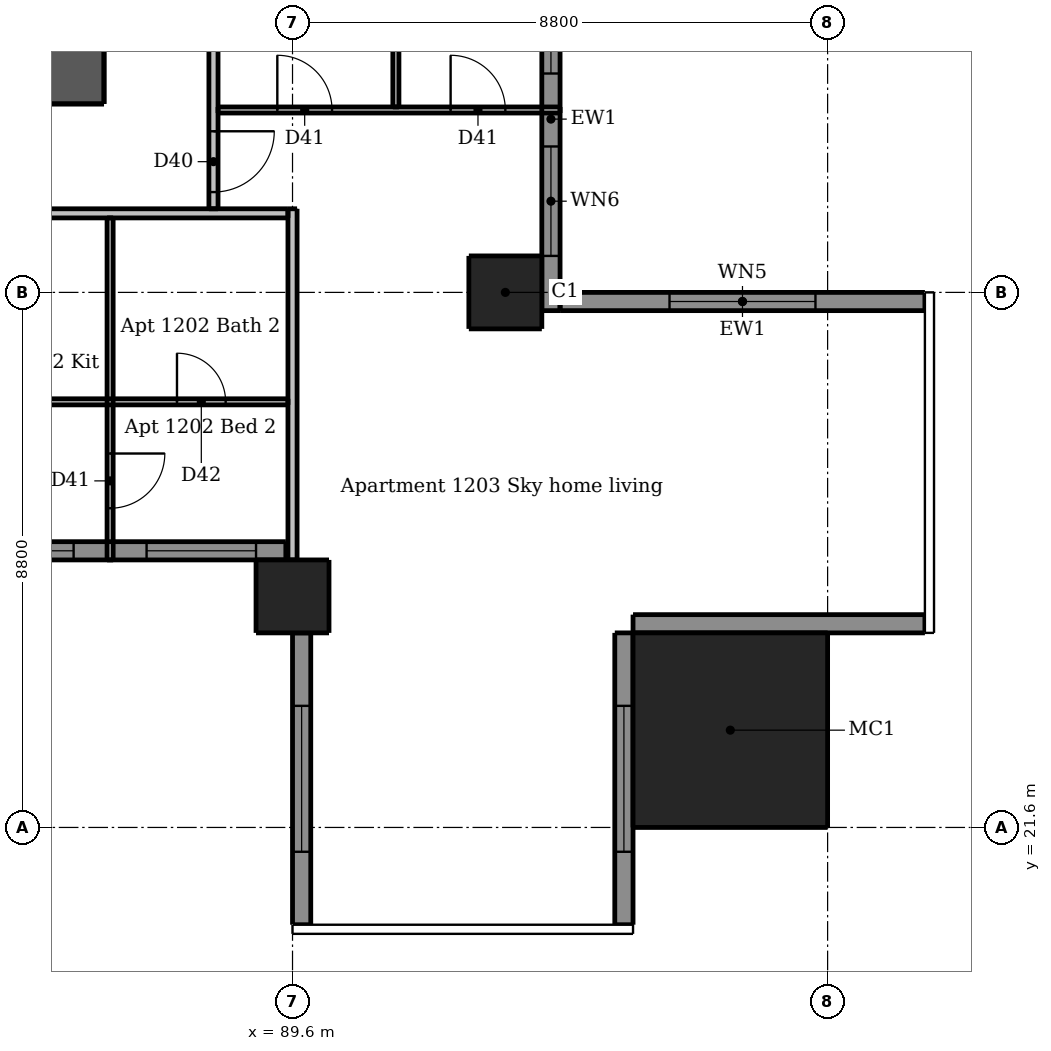
"""IFC4 building model, lengths in metres.
Left out: names, types, materials, properties, quantities, classifications, styles, units other than length and angle.
Written with IfcOpenShell. Run it as: python <this file> out.ifc"""

import sys

from ifc_helpers import new_model, si_unit, direction, frame, frame_2d, origin, origin_2d, place, context, subcontext, project, spatial, rectangle, extrude, element, fill, save


model = new_model("IFC4")
c1 = context("Model", 3, precision=1e-05, world=origin(), true_north=direction((0.0, 1.0)))
c2 = subcontext(c1, "Body", "Model", "MODEL_VIEW")
j1 = project(units=[si_unit("LENGTHUNIT", "METRE"), si_unit("PLANEANGLEUNIT", "RADIAN")], contexts=[c1])
p1 = place(None, origin())
s1 = spatial("IfcSite", under=j1, at=p1, CompositionType="ELEMENT")
p2 = place(p1, origin())
s2 = spatial("IfcBuilding", under=s1, at=p2, CompositionType="ELEMENT")
p3 = place(p2, frame((0.0, 0.0, 46.6)))
s3 = spatial("IfcBuildingStorey", under=s2, at=p3, CompositionType="ELEMENT", Elevation=46.6)
p4 = place(p3, frame((62.5, 33.95, 0.0), z_axis=(0.0, 0.0, 1.0), x_axis=(1.0, 0.0, 0.0)))
e1 = element("IfcWall", 1, at=p4, inside=s3, PredefinedType="SHEAR", context=c2, shape_type="SweptSolid", body=[
    extrude(rectangle(XDim=24.0, YDim=0.9, at=frame_2d((12.0, 0.0))), origin(), (0.0, 0.0, 1.0), 3.05),
])
p5 = place(p4, frame((2.05, 0.0, 0.0)))
e2 = element("IfcOpeningElement", 2, at=p5, cuts=e1, PredefinedType="OPENING", context=c2, shape_type="SweptSolid", body=[
    extrude(rectangle(XDim=1.1, YDim=2.1, at=frame_2d((0.55, 1.05))), frame((0.0, 0.46, 0.0), z_axis=(0.0, -1.0, 0.0), x_axis=(1.0, 0.0, 0.0)), (0.0, 0.0, 1.0), 0.92),
])
p6 = place(p4, frame((20.85, 0.0, 0.0)))
e3 = element("IfcOpeningElement", 3, at=p6, cuts=e1, PredefinedType="OPENING", context=c2, shape_type="SweptSolid", body=[
    extrude(rectangle(XDim=1.1, YDim=2.1, at=frame_2d((0.55, 1.05))), frame((0.0, 0.46, 0.0), z_axis=(0.0, -1.0, 0.0), x_axis=(1.0, 0.0, 0.0)), (0.0, 0.0, 1.0), 0.92),
])
p7 = place(p4, frame((8.0, 0.0, 0.0)))
e4 = element("IfcOpeningElement", 4, at=p7, cuts=e1, PredefinedType="OPENING", context=c2, shape_type="SweptSolid", body=[
    extrude(rectangle(XDim=1.1, YDim=2.1, at=frame_2d((0.55, 1.05))), frame((0.0, 0.46, 0.0), z_axis=(0.0, -1.0, 0.0), x_axis=(1.0, 0.0, 0.0)), (0.0, 0.0, 1.0), 0.92),
])
p8 = place(p4, frame((17.488, 0.0, 0.0)))
e5 = element("IfcOpeningElement", 5, at=p8, cuts=e1, PredefinedType="OPENING", context=c2, shape_type="SweptSolid", body=[
    extrude(rectangle(XDim=0.9, YDim=2.1, at=frame_2d((0.45, 1.05))), frame((0.0, 0.46, 0.0), z_axis=(0.0, -1.0, 0.0), x_axis=(1.0, 0.0, 0.0)), (0.0, 0.0, 1.0), 0.92),
])
p9 = place(p3, frame((86.05, 33.5, 0.0), z_axis=(0.0, 0.0, 1.0), x_axis=(0.0, 1.0, 0.0)))
e6 = element("IfcWall", 6, at=p9, inside=s3, PredefinedType="SHEAR", context=c2, shape_type="SweptSolid", body=[
    extrude(rectangle(XDim=24.0, YDim=0.9, at=frame_2d((12.0, 0.0))), origin(), (0.0, 0.0, 1.0), 3.05),
])
p10 = place(p9, frame((11.2, 0.0, 0.0)))
e7 = element("IfcOpeningElement", 7, at=p10, cuts=e6, PredefinedType="OPENING", context=c2, shape_type="SweptSolid", body=[
    extrude(rectangle(XDim=1.6, YDim=2.1, at=frame_2d((0.8, 1.05))), frame((0.0, 0.46, 0.0), z_axis=(0.0, -1.0, 0.0), x_axis=(1.0, 0.0, 0.0)), (0.0, 0.0, 1.0), 0.92),
])
for number, where, z_axis, x_axis in (
    (8, (89.6, 25.4, 0.0), (0.0, 0.0, 1.0), (1.0, 0.0, 0.0)),
    (9, (93.1, 30.4, 0.0), (0.0, 0.0, 1.0), (1.0, 0.0, 0.0)),
):
    element("IfcColumn", number, at=place(p3, frame(where, z_axis=z_axis, x_axis=x_axis)), inside=s3, PredefinedType="COLUMN", context=c2, shape_type="SweptSolid", body=[
        extrude(rectangle(XDim=1.2, YDim=1.2, at=origin_2d()), origin(), (0.0, 0.0, 1.0), 3.05),
    ])
p11 = place(p3, frame((96.8, 23.2, 0.0), z_axis=(0.0, 0.0, 1.0), x_axis=(1.0, 0.0, 0.0)))
e10 = element("IfcColumn", 10, at=p11, inside=s3, PredefinedType="COLUMN", context=c2, shape_type="SweptSolid", body=[
    extrude(rectangle(XDim=3.2, YDim=3.2, at=origin_2d()), origin(), (0.0, 0.0, 1.0), 3.3),
])
p12 = place(p3, frame((89.75, 24.8, 0.0), z_axis=(0.0, 0.0, 1.0), x_axis=(0.0, -1.0, 0.0)))
e11 = element("IfcWall", 11, at=p12, inside=s3, PredefinedType="SOLIDWALL", context=c2, shape_type="SweptSolid", body=[
    extrude(rectangle(XDim=4.8, YDim=0.3, at=frame_2d((2.4, 0.0))), origin(), (0.0, 0.0, 1.0), 3.05),
])
p13 = place(p12, frame((1.2, 0.0, 0.15)))
e12 = element("IfcOpeningElement", 12, at=p13, cuts=e11, PredefinedType="OPENING", context=c2, shape_type="SweptSolid", body=[
    extrude(rectangle(XDim=2.4, YDim=2.1, at=frame_2d((1.2, 1.05))), frame((0.0, 0.16, 0.0), z_axis=(0.0, -1.0, 0.0), x_axis=(1.0, 0.0, 0.0)), (0.0, 0.0, 1.0), 0.32),
])
p14 = place(p3, frame((95.05, 20.0, 0.0), z_axis=(0.0, 0.0, 1.0), x_axis=(0.0, 1.0, 0.0)))
e13 = element("IfcWall", 13, at=p14, inside=s3, PredefinedType="SOLIDWALL", context=c2, shape_type="SweptSolid", body=[
    extrude(rectangle(XDim=4.8, YDim=0.3, at=frame_2d((2.4, 0.0))), origin(), (0.0, 0.0, 1.0), 3.05),
])
p15 = place(p14, frame((1.2, 0.0, 0.15)))
e14 = element("IfcOpeningElement", 14, at=p15, cuts=e13, PredefinedType="OPENING", context=c2, shape_type="SweptSolid", body=[
    extrude(rectangle(XDim=2.4, YDim=2.1, at=frame_2d((1.2, 1.05))), frame((0.0, 0.16, 0.0), z_axis=(0.0, -1.0, 0.0), x_axis=(1.0, 0.0, 0.0)), (0.0, 0.0, 1.0), 0.32),
])
p16 = place(p3, frame((95.2, 24.95, 0.0), z_axis=(0.0, 0.0, 1.0), x_axis=(1.0, 0.0, 0.0)))
e15 = element("IfcWall", 15, at=p16, inside=s3, PredefinedType="SOLIDWALL", context=c2, shape_type="SweptSolid", body=[
    extrude(rectangle(XDim=4.8, YDim=0.3, at=frame_2d((2.4, 0.0))), origin(), (0.0, 0.0, 1.0), 3.05),
])
p17 = place(p3, frame((100.0, 30.25, 0.0), z_axis=(0.0, 0.0, 1.0), x_axis=(-1.0, 0.0, 0.0)))
e16 = element("IfcWall", 16, at=p17, inside=s3, PredefinedType="SOLIDWALL", context=c2, shape_type="SweptSolid", body=[
    extrude(rectangle(XDim=6.0, YDim=0.3, at=frame_2d((3.0, 0.0))), origin(), (0.0, 0.0, 1.0), 3.05),
])
p18 = place(p17, frame((1.8, 0.0, 0.15)))
e17 = element("IfcOpeningElement", 17, at=p18, cuts=e16, PredefinedType="OPENING", context=c2, shape_type="SweptSolid", body=[
    extrude(rectangle(XDim=2.4, YDim=2.1, at=frame_2d((1.2, 1.05))), frame((0.0, 0.16, 0.0), z_axis=(0.0, -1.0, 0.0), x_axis=(1.0, 0.0, 0.0)), (0.0, 0.0, 1.0), 0.32),
])
p19 = place(p3, frame((83.6, 26.15, 0.0), z_axis=(0.0, 0.0, 1.0), x_axis=(1.0, 0.0, 0.0)))
e18 = element("IfcWall", 18, at=p19, inside=s3, PredefinedType="SOLIDWALL", context=c2, shape_type="SweptSolid", body=[
    extrude(rectangle(XDim=5.89, YDim=0.3, at=frame_2d((2.945, 0.0))), origin(), (0.0, 0.0, 1.0), 3.05),
])
p20 = place(p19, frame((0.6, 0.0, 0.15)))
e19 = element("IfcOpeningElement", 19, at=p20, cuts=e18, PredefinedType="OPENING", context=c2, shape_type="SweptSolid", body=[
    extrude(rectangle(XDim=1.8, YDim=2.1, at=frame_2d((0.9, 1.05))), frame((0.0, 0.16, 0.0), z_axis=(0.0, -1.0, 0.0), x_axis=(1.0, 0.0, 0.0)), (0.0, 0.0, 1.0), 0.32),
])
p21 = place(p19, frame((3.6, 0.0, 0.15)))
e20 = element("IfcOpeningElement", 20, at=p21, cuts=e18, PredefinedType="OPENING", context=c2, shape_type="SweptSolid", body=[
    extrude(rectangle(XDim=1.8, YDim=2.1, at=frame_2d((0.9, 1.05))), frame((0.0, 0.16, 0.0), z_axis=(0.0, -1.0, 0.0), x_axis=(1.0, 0.0, 0.0)), (0.0, 0.0, 1.0), 0.32),
])
p22 = place(p3, frame((93.85, 30.1, 0.0), z_axis=(0.0, 0.0, 1.0), x_axis=(0.0, 1.0, 0.0)))
e21 = element("IfcWall", 21, at=p22, inside=s3, PredefinedType="SOLIDWALL", context=c2, shape_type="SweptSolid", body=[
    extrude(rectangle(XDim=6.3, YDim=0.3, at=frame_2d((3.15, 0.0))), origin(), (0.0, 0.0, 1.0), 3.05),
])
p23 = place(p22, frame((0.9, 0.0, 0.15)))
e22 = element("IfcOpeningElement", 22, at=p23, cuts=e21, PredefinedType="OPENING", context=c2, shape_type="SweptSolid", body=[
    extrude(rectangle(XDim=1.8, YDim=2.1, at=frame_2d((0.9, 1.05))), frame((0.0, 0.16, 0.0), z_axis=(0.0, -1.0, 0.0), x_axis=(1.0, 0.0, 0.0)), (0.0, 0.0, 1.0), 0.32),
])
p24 = place(p22, frame((3.9, 0.0, 0.15)))
e23 = element("IfcOpeningElement", 23, at=p24, cuts=e21, PredefinedType="OPENING", context=c2, shape_type="SweptSolid", body=[
    extrude(rectangle(XDim=1.8, YDim=2.1, at=frame_2d((0.9, 1.05))), frame((0.0, 0.16, 0.0), z_axis=(0.0, -1.0, 0.0), x_axis=(1.0, 0.0, 0.0)), (0.0, 0.0, 1.0), 0.32),
])
p25 = place(p3, frame((86.6, 31.625, 0.0), z_axis=(0.0, 0.0, 1.0), x_axis=(0.0, -1.0, 0.0)))
e24 = element("IfcWall", 24, at=p25, inside=s3, PredefinedType="PARTITIONING", context=c2, shape_type="SweptSolid", body=[
    extrude(rectangle(XDim=5.625, YDim=0.1, at=frame_2d((2.812, 0.0))), origin(), (0.0, 0.0, 1.0), 3.05),
])
p26 = place(p25, frame((3.875, 0.0, 0.0)))
e25 = element("IfcOpeningElement", 25, at=p26, cuts=e24, PredefinedType="OPENING", context=c2, shape_type="SweptSolid", body=[
    extrude(rectangle(XDim=0.9, YDim=2.1, at=frame_2d((0.45, 1.05))), frame((0.0, 0.06, 0.0), z_axis=(0.0, -1.0, 0.0), x_axis=(1.0, 0.0, 0.0)), (0.0, 0.0, 1.0), 0.12),
])
p27 = place(p3, frame((91.3, 33.45, 0.0), z_axis=(0.0, 0.0, 1.0), x_axis=(0.0, 1.0, 0.0)))
e26 = element("IfcWall", 26, at=p27, inside=s3, PredefinedType="PARTITIONING", context=c2, shape_type="SweptSolid", body=[
    extrude(rectangle(XDim=5.975, YDim=0.1, at=frame_2d((2.988, 0.0))), origin(), (0.0, 0.0, 1.0), 3.05),
])
p28 = place(p27, frame((3.8, 0.0, 0.0)))
e27 = element("IfcOpeningElement", 27, at=p28, cuts=e26, PredefinedType="OPENING", context=c2, shape_type="SweptSolid", body=[
    extrude(rectangle(XDim=0.8, YDim=2.1, at=frame_2d((0.4, 1.05))), frame((0.0, 0.06, 0.0), z_axis=(0.0, -1.0, 0.0), x_axis=(1.0, 0.0, 0.0)), (0.0, 0.0, 1.0), 0.12),
])
p29 = place(p3, frame((88.375, 33.4, 0.0), z_axis=(0.0, 0.0, 1.0), x_axis=(1.0, 0.0, 0.0)))
e28 = element("IfcWall", 28, at=p29, inside=s3, PredefinedType="PARTITIONING", context=c2, shape_type="SweptSolid", body=[
    extrude(rectangle(XDim=5.625, YDim=0.1, at=frame_2d((2.812, 0.0))), origin(), (0.0, 0.0, 1.0), 3.05),
])
p30 = place(p29, frame((0.975, 0.0, 0.0)))
e29 = element("IfcOpeningElement", 29, at=p30, cuts=e28, PredefinedType="OPENING", context=c2, shape_type="SweptSolid", body=[
    extrude(rectangle(XDim=0.9, YDim=2.1, at=frame_2d((0.45, 1.05))), frame((0.0, 0.06, 0.0), z_axis=(0.0, -1.0, 0.0), x_axis=(1.0, 0.0, 0.0)), (0.0, 0.0, 1.0), 0.12),
])
p31 = place(p29, frame((3.825, 0.0, 0.0)))
e30 = element("IfcOpeningElement", 30, at=p31, cuts=e28, PredefinedType="OPENING", context=c2, shape_type="SweptSolid", body=[
    extrude(rectangle(XDim=0.9, YDim=2.1, at=frame_2d((0.45, 1.05))), frame((0.0, 0.06, 0.0), z_axis=(0.0, -1.0, 0.0), x_axis=(1.0, 0.0, 0.0)), (0.0, 0.0, 1.0), 0.12),
])
p32 = place(p3, frame((84.25, 28.6, 0.0), z_axis=(0.0, 0.0, 1.0), x_axis=(1.0, 0.0, 0.0)))
e31 = element("IfcWall", 31, at=p32, inside=s3, PredefinedType="PARTITIONING", context=c2, shape_type="SweptSolid", body=[
    extrude(rectangle(XDim=5.275, YDim=0.1, at=frame_2d((2.637, 0.0))), origin(), (0.0, 0.0, 1.0), 3.05),
])
p33 = place(p32, frame((3.45, 0.0, 0.0)))
e32 = element("IfcOpeningElement", 32, at=p33, cuts=e31, PredefinedType="OPENING", context=c2, shape_type="SweptSolid", body=[
    extrude(rectangle(XDim=0.8, YDim=2.1, at=frame_2d((0.4, 1.05))), frame((0.0, 0.06, 0.0), z_axis=(0.0, -1.0, 0.0), x_axis=(1.0, 0.0, 0.0)), (0.0, 0.0, 1.0), 0.12),
])
p34 = place(p3, frame((88.3, 60.475, 0.0), z_axis=(0.0, 0.0, 1.0), x_axis=(0.0, -1.0, 0.0)))
e33 = element("IfcWall", 33, at=p34, inside=s3, PredefinedType="PARTITIONING", context=c2, shape_type="SweptSolid", body=[
    extrude(rectangle(XDim=28.7, YDim=0.15, at=frame_2d((14.35, 0.0))), origin(), (0.0, 0.0, 1.0), 3.05),
])
p35 = place(p34, frame((27.425, 0.0, 0.0)))
e34 = element("IfcOpeningElement", 34, at=p35, cuts=e33, PredefinedType="OPENING", context=c2, shape_type="SweptSolid", body=[
    extrude(rectangle(XDim=1.0, YDim=2.1, at=frame_2d((0.5, 1.05))), frame((0.0, 0.085, 0.0), z_axis=(0.0, -1.0, 0.0), x_axis=(1.0, 0.0, 0.0)), (0.0, 0.0, 1.0), 0.17),
])
p36 = place(p34, frame((10.575, 0.0, 0.0)))
e35 = element("IfcOpeningElement", 35, at=p36, cuts=e33, PredefinedType="OPENING", context=c2, shape_type="SweptSolid", body=[
    extrude(rectangle(XDim=1.0, YDim=2.1, at=frame_2d((0.5, 1.05))), frame((0.0, 0.085, 0.0), z_axis=(0.0, -1.0, 0.0), x_axis=(1.0, 0.0, 0.0)), (0.0, 0.0, 1.0), 0.17),
])
p37 = place(p3, frame((89.6, 26.0, 0.0), z_axis=(0.0, 0.0, 1.0), x_axis=(0.0, 1.0, 0.0)))
e36 = element("IfcWall", 36, at=p37, inside=s3, PredefinedType="PARTITIONING", context=c2, shape_type="SweptSolid", body=[
    extrude(rectangle(XDim=5.775, YDim=0.15, at=frame_2d((2.887, 0.0))), origin(), (0.0, 0.0, 1.0), 2.516),
])
p38 = place(p3, frame((89.525, 31.7, 0.0), z_axis=(0.0, 0.0, 1.0), x_axis=(-1.0, 0.0, 0.0)))
e37 = element("IfcWall", 37, at=p38, inside=s3, PredefinedType="PARTITIONING", context=c2, shape_type="SweptSolid", body=[
    extrude(rectangle(XDim=28.75, YDim=0.15, at=frame_2d((14.375, 0.0))), origin(), (0.0, 0.0, 1.0), 3.05),
])
p39 = place(p38, frame((24.325, 0.0, 0.0)))
e38 = element("IfcOpeningElement", 38, at=p39, cuts=e37, PredefinedType="OPENING", context=c2, shape_type="SweptSolid", body=[
    extrude(rectangle(XDim=1.0, YDim=2.1, at=frame_2d((0.5, 1.05))), frame((0.0, 0.085, 0.0), z_axis=(0.0, -1.0, 0.0), x_axis=(1.0, 0.0, 0.0)), (0.0, 0.0, 1.0), 0.17),
])
p40 = place(p38, frame((6.575, 0.0, 0.0)))
e39 = element("IfcOpeningElement", 39, at=p40, cuts=e37, PredefinedType="OPENING", context=c2, shape_type="SweptSolid", body=[
    extrude(rectangle(XDim=1.0, YDim=2.1, at=frame_2d((0.5, 1.05))), frame((0.0, 0.085, 0.0), z_axis=(0.0, -1.0, 0.0), x_axis=(1.0, 0.0, 0.0)), (0.0, 0.0, 1.0), 0.17),
])
p41 = place(p13, origin())
e40 = element("IfcWindow", 40, at=p41, inside=s3, PartitioningType="DOUBLE_PANEL_VERTICAL", PredefinedType="WINDOW", context=c2, shape_type="SweptSolid", body=[
    extrude(rectangle(XDim=2.4, YDim=2.1, at=frame_2d((1.2, 1.05))), frame((0.0, 0.03, 0.0), z_axis=(0.0, -1.0, 0.0), x_axis=(1.0, 0.0, 0.0)), (0.0, 0.0, 1.0), 0.06),
])
fill(e12, e40)
p42 = place(p15, origin())
e41 = element("IfcWindow", 41, at=p42, inside=s3, PartitioningType="DOUBLE_PANEL_VERTICAL", PredefinedType="WINDOW", context=c2, shape_type="SweptSolid", body=[
    extrude(rectangle(XDim=2.4, YDim=2.1, at=frame_2d((1.2, 1.05))), frame((0.0, 0.03, 0.0), z_axis=(0.0, -1.0, 0.0), x_axis=(1.0, 0.0, 0.0)), (0.0, 0.0, 1.0), 0.06),
])
fill(e14, e41)
p43 = place(p18, origin())
e42 = element("IfcWindow", 42, at=p43, inside=s3, PartitioningType="DOUBLE_PANEL_VERTICAL", PredefinedType="WINDOW", context=c2, shape_type="SweptSolid", body=[
    extrude(rectangle(XDim=2.4, YDim=2.1, at=frame_2d((1.2, 1.05))), frame((0.0, 0.03, 0.0), z_axis=(0.0, -1.0, 0.0), x_axis=(1.0, 0.0, 0.0)), (0.0, 0.0, 1.0), 0.06),
])
fill(e17, e42)
p44 = place(p20, origin())
e43 = element("IfcWindow", 43, at=p44, inside=s3, PartitioningType="DOUBLE_PANEL_VERTICAL", PredefinedType="WINDOW", context=c2, shape_type="SweptSolid", body=[
    extrude(rectangle(XDim=1.8, YDim=2.1, at=frame_2d((0.9, 1.05))), frame((0.0, 0.03, 0.0), z_axis=(0.0, -1.0, 0.0), x_axis=(1.0, 0.0, 0.0)), (0.0, 0.0, 1.0), 0.06),
])
fill(e19, e43)
p45 = place(p21, origin())
e44 = element("IfcWindow", 44, at=p45, inside=s3, PartitioningType="DOUBLE_PANEL_VERTICAL", PredefinedType="WINDOW", context=c2, shape_type="SweptSolid", body=[
    extrude(rectangle(XDim=1.8, YDim=2.1, at=frame_2d((0.9, 1.05))), frame((0.0, 0.03, 0.0), z_axis=(0.0, -1.0, 0.0), x_axis=(1.0, 0.0, 0.0)), (0.0, 0.0, 1.0), 0.06),
])
fill(e20, e44)
p46 = place(p23, origin())
e45 = element("IfcWindow", 45, at=p46, inside=s3, PartitioningType="DOUBLE_PANEL_VERTICAL", PredefinedType="WINDOW", context=c2, shape_type="SweptSolid", body=[
    extrude(rectangle(XDim=1.8, YDim=2.1, at=frame_2d((0.9, 1.05))), frame((0.0, 0.03, 0.0), z_axis=(0.0, -1.0, 0.0), x_axis=(1.0, 0.0, 0.0)), (0.0, 0.0, 1.0), 0.06),
])
fill(e22, e45)
p47 = place(p24, origin())
e46 = element("IfcWindow", 46, at=p47, inside=s3, PartitioningType="DOUBLE_PANEL_VERTICAL", PredefinedType="WINDOW", context=c2, shape_type="SweptSolid", body=[
    extrude(rectangle(XDim=1.8, YDim=2.1, at=frame_2d((0.9, 1.05))), frame((0.0, 0.03, 0.0), z_axis=(0.0, -1.0, 0.0), x_axis=(1.0, 0.0, 0.0)), (0.0, 0.0, 1.0), 0.06),
])
fill(e23, e46)
p48 = place(p26, origin())
e47 = element("IfcDoor", 47, at=p48, inside=s3, OperationType="SINGLE_SWING_LEFT", PredefinedType="DOOR", context=c2, shape_type="SweptSolid", body=[
    extrude(rectangle(XDim=0.9, YDim=2.1, at=frame_2d((0.45, 1.05))), frame((0.0, 0.025, 0.0), z_axis=(0.0, -1.0, 0.0), x_axis=(1.0, 0.0, 0.0)), (0.0, 0.0, 1.0), 0.05),
])
fill(e25, e47)
p49 = place(p33, origin())
e48 = element("IfcDoor", 48, at=p49, inside=s3, OperationType="SINGLE_SWING_LEFT", PredefinedType="DOOR", context=c2, shape_type="SweptSolid", body=[
    extrude(rectangle(XDim=0.8, YDim=2.1, at=frame_2d((0.4, 1.05))), frame((0.0, 0.025, 0.0), z_axis=(0.0, -1.0, 0.0), x_axis=(1.0, 0.0, 0.0)), (0.0, 0.0, 1.0), 0.05),
])
fill(e32, e48)
p50 = place(p35, origin())
e49 = element("IfcDoor", 49, at=p50, inside=s3, OperationType="SINGLE_SWING_LEFT", PredefinedType="DOOR", context=c2, shape_type="SweptSolid", body=[
    extrude(rectangle(XDim=1.0, YDim=2.1, at=frame_2d((0.5, 1.05))), frame((0.0, 0.025, 0.0), z_axis=(0.0, -1.0, 0.0), x_axis=(1.0, 0.0, 0.0)), (0.0, 0.0, 1.0), 0.05),
])
fill(e34, e49)
p51 = place(p30, origin())
e50 = element("IfcDoor", 50, at=p51, inside=s3, OperationType="SINGLE_SWING_LEFT", PredefinedType="DOOR", context=c2, shape_type="SweptSolid", body=[
    extrude(rectangle(XDim=0.9, YDim=2.1, at=frame_2d((0.45, 1.05))), frame((0.0, 0.025, 0.0), z_axis=(0.0, -1.0, 0.0), x_axis=(1.0, 0.0, 0.0)), (0.0, 0.0, 1.0), 0.05),
])
fill(e29, e50)
p52 = place(p31, origin())
e51 = element("IfcDoor", 51, at=p52, inside=s3, OperationType="SINGLE_SWING_LEFT", PredefinedType="DOOR", context=c2, shape_type="SweptSolid", body=[
    extrude(rectangle(XDim=0.9, YDim=2.1, at=frame_2d((0.45, 1.05))), frame((0.0, 0.025, 0.0), z_axis=(0.0, -1.0, 0.0), x_axis=(1.0, 0.0, 0.0)), (0.0, 0.0, 1.0), 0.05),
])
fill(e30, e51)
save(model, sys.argv[1])
